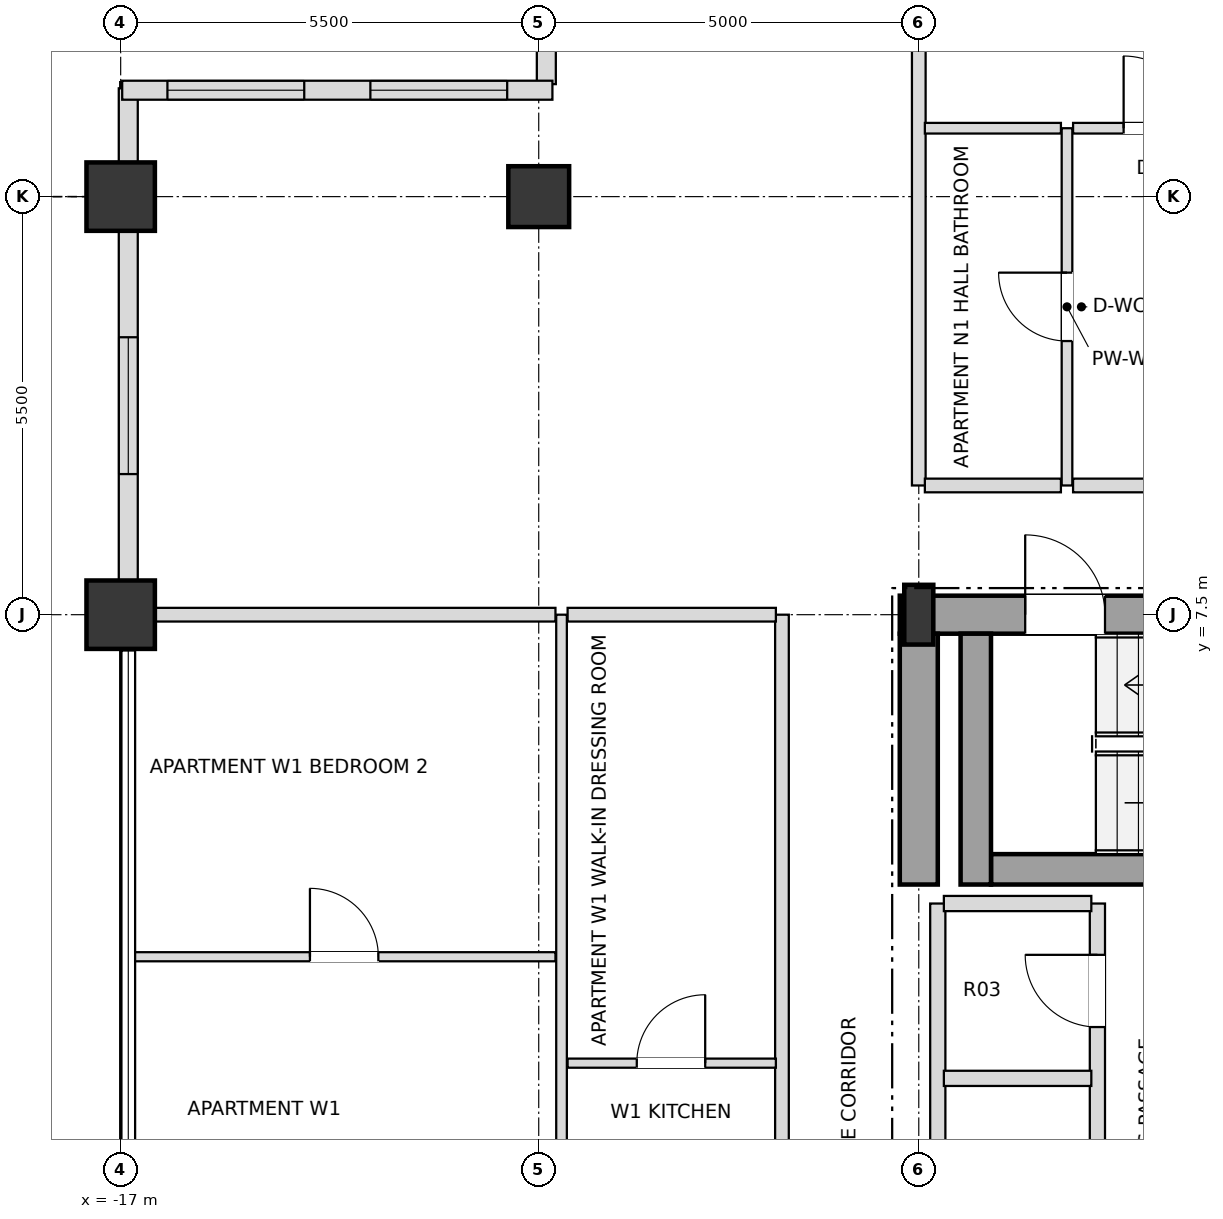
"""IFC4 building model, lengths in metres.
Left out: names, types, materials, properties, quantities, classifications, styles, units other than length and angle.
Written with IfcOpenShell. Run it as: python <this file> out.ifc"""

import sys

from ifc_helpers import new_model, si_unit, direction, frame, frame_2d, origin, origin_2d, place, context, subcontext, project, spatial, rectangle, i_section, extrude, element, fill, save


model = new_model("IFC4")
c1 = context("Model", 3, precision=1e-05, world=origin(), true_north=direction((0.0, 1.0)))
c2 = subcontext(c1, "Body", "Model", "MODEL_VIEW")
j1 = project(units=[si_unit("LENGTHUNIT", "METRE"), si_unit("PLANEANGLEUNIT", "RADIAN")], contexts=[c1])
p1 = place(None, origin())
s1 = spatial("IfcSite", under=j1, at=p1, CompositionType="ELEMENT")
p2 = place(p1, origin())
s2 = spatial("IfcBuilding", under=s1, at=p2, CompositionType="ELEMENT")
p3 = place(p2, frame((0.0, 0.0, 251.1)))
s3 = spatial("IfcBuildingStorey", under=s2, at=p3, CompositionType="ELEMENT", Elevation=251.1)
p4 = place(p3, frame((-6.5, 7.5, 0.0), z_axis=(0.0, 0.0, 1.0), x_axis=(1.0, 0.0, 0.0)))
e1 = element("IfcColumn", 1, at=p4, inside=s3, PredefinedType="COLUMN", context=c2, shape_type="SweptSolid", body=[
    extrude(i_section(OverallWidth=0.382, OverallDepth=0.786, WebThickness=0.02, FlangeThickness=0.033, at=origin_2d()), origin(), (0.0, 0.0, 1.0), 3.6),
])
for number, where, z_axis, x_axis in (
    (2, (-17.0, 13.0, 0.0), (0.0, 0.0, 1.0), (1.0, 0.0, 0.0)),
    (3, (-17.0, 7.5, 0.0), (0.0, 0.0, 1.0), (1.0, 0.0, 0.0)),
):
    element("IfcColumn", number, at=place(p3, frame(where, z_axis=z_axis, x_axis=x_axis)), inside=s3, PredefinedType="USERDEFINED", context=c2, shape_type="SweptSolid", body=[
        extrude(rectangle(XDim=0.9, YDim=0.9, at=origin_2d()), origin(), (0.0, 0.0, 1.0), 3.6),
    ])
p5 = place(p3, frame((-11.5, 13.0, 0.0), z_axis=(0.0, 0.0, 1.0), x_axis=(1.0, 0.0, 0.0)))
e4 = element("IfcColumn", 4, at=p5, inside=s3, PredefinedType="COLUMN", context=c2, shape_type="SweptSolid", body=[
    extrude(rectangle(XDim=0.8, YDim=0.8, at=origin_2d()), origin(), (0.0, 0.0, 1.0), 3.6),
])
p6 = place(p3, frame((-16.9, 14.425, 0.0), z_axis=(0.0, 0.0, 1.0), x_axis=(0.0, -1.0, 0.0)))
e5 = element("IfcWall", 5, at=p6, inside=s3, PredefinedType="SOLIDWALL", context=c2, shape_type="SweptSolid", body=[
    extrude(rectangle(XDim=0.98, YDim=0.25, at=frame_2d((0.49, 0.0))), origin(), (0.0, 0.0, 1.0), 2.748),
])
p7 = place(p3, frame((-16.9, 12.555, 0.0), z_axis=(0.0, 0.0, 1.0), x_axis=(0.0, -1.0, 0.0)))
e6 = element("IfcWall", 6, at=p7, inside=s3, PredefinedType="SOLIDWALL", context=c2, shape_type="SweptSolid", body=[
    extrude(rectangle(XDim=4.61, YDim=0.25, at=frame_2d((2.305, 0.0))), origin(), (0.0, 0.0, 1.0), 2.748),
])
p8 = place(p7, frame((1.405, 0.0, 0.72)))
e7 = element("IfcOpeningElement", 7, at=p8, cuts=e6, PredefinedType="OPENING", context=c2, shape_type="SweptSolid", body=[
    extrude(rectangle(XDim=1.8, YDim=1.68, at=frame_2d((0.9, 0.84))), frame((0.0, 0.135, 0.0), z_axis=(0.0, -1.0, 0.0), x_axis=(1.0, 0.0, 0.0)), (0.0, 0.0, 1.0), 0.27),
])
p9 = place(p3, frame((-11.4, 19.82, 0.0), z_axis=(0.0, 0.0, 1.0), x_axis=(0.0, -1.0, 0.0)))
e8 = element("IfcWall", 8, at=p9, inside=s3, PredefinedType="SOLIDWALL", context=c2, shape_type="SweptSolid", body=[
    extrude(rectangle(XDim=5.34, YDim=0.25, at=frame_2d((2.67, 0.0))), origin(), (0.0, 0.0, 1.0), 2.748),
])
p10 = place(p9, frame((1.925, 0.0, 0.72)))
e9 = element("IfcOpeningElement", 9, at=p10, cuts=e8, PredefinedType="OPENING", context=c2, shape_type="SweptSolid", body=[
    extrude(rectangle(XDim=1.8, YDim=1.68, at=frame_2d((0.9, 0.84))), frame((0.0, 0.135, 0.0), z_axis=(0.0, -1.0, 0.0), x_axis=(1.0, 0.0, 0.0)), (0.0, 0.0, 1.0), 0.27),
])
p11 = place(p3, frame((-11.32, 14.4, 0.0), z_axis=(0.0, 0.0, 1.0), x_axis=(-1.0, 0.0, 0.0)))
e10 = element("IfcWall", 10, at=p11, inside=s3, PredefinedType="SOLIDWALL", context=c2, shape_type="SweptSolid", body=[
    extrude(rectangle(XDim=5.66, YDim=0.25, at=frame_2d((2.83, 0.0))), origin(), (0.0, 0.0, 1.0), 2.748),
])
p12 = place(p11, frame((0.595, 0.0, 0.72)))
e11 = element("IfcOpeningElement", 11, at=p12, cuts=e10, PredefinedType="OPENING", context=c2, shape_type="SweptSolid", body=[
    extrude(rectangle(XDim=1.8, YDim=1.68, at=frame_2d((0.9, 0.84))), frame((0.0, 0.135, 0.0), z_axis=(0.0, -1.0, 0.0), x_axis=(1.0, 0.0, 0.0)), (0.0, 0.0, 1.0), 0.27),
])
p13 = place(p11, frame((3.265, 0.0, 0.72)))
e12 = element("IfcOpeningElement", 12, at=p13, cuts=e10, PredefinedType="OPENING", context=c2, shape_type="SweptSolid", body=[
    extrude(rectangle(XDim=1.8, YDim=1.68, at=frame_2d((0.9, 0.84))), frame((0.0, 0.135, 0.0), z_axis=(0.0, -1.0, 0.0), x_axis=(1.0, 0.0, 0.0)), (0.0, 0.0, 1.0), 0.27),
])
p14 = place(p3, frame((-6.75, 7.5, 0.0), z_axis=(0.0, 0.0, 1.0), x_axis=(1.0, 0.0, 0.0)))
e13 = element("IfcWall", 13, at=p14, inside=s3, PredefinedType="SHEAR", context=c2, shape_type="SweptSolid", body=[
    extrude(rectangle(XDim=6.75, YDim=0.5, at=frame_2d((3.375, 0.0))), origin(), (0.0, 0.0, 1.0), 3.38),
])
p15 = place(p14, frame((1.65, 0.0, 0.0)))
e14 = element("IfcOpeningElement", 14, at=p15, cuts=e13, PredefinedType="OPENING", context=c2, shape_type="SweptSolid", body=[
    extrude(rectangle(XDim=1.05, YDim=2.15, at=frame_2d((0.525, 1.075))), frame((0.0, 0.26, 0.0), z_axis=(0.0, -1.0, 0.0), x_axis=(1.0, 0.0, 0.0)), (0.0, 0.0, 1.0), 0.52),
])
p16 = place(p3, frame((-6.5, 3.95, 0.0), z_axis=(0.0, 0.0, 1.0), x_axis=(0.0, 1.0, 0.0)))
e15 = element("IfcWall", 15, at=p16, inside=s3, PredefinedType="SHEAR", context=c2, shape_type="SweptSolid", body=[
    extrude(rectangle(XDim=3.3, YDim=0.5, at=frame_2d((1.65, 0.0))), origin(), (0.0, 0.0, 1.0), 3.38),
])
p17 = place(p3, frame((-5.55, 4.15, 0.0), z_axis=(0.0, 0.0, 1.0), x_axis=(1.0, 0.0, 0.0)))
e16 = element("IfcWall", 16, at=p17, inside=s3, PredefinedType="SHEAR", context=c2, shape_type="SweptSolid", body=[
    extrude(rectangle(XDim=7.08, YDim=0.4, at=frame_2d((3.54, 0.0))), origin(), (0.0, 0.0, 1.0), 3.38),
])
p18 = place(p3, frame((-5.75, 3.95, 0.0), z_axis=(0.0, 0.0, 1.0), x_axis=(0.0, 1.0, 0.0)))
e17 = element("IfcWall", 17, at=p18, inside=s3, PredefinedType="SHEAR", context=c2, shape_type="SweptSolid", body=[
    extrude(rectangle(XDim=3.3, YDim=0.4, at=frame_2d((1.65, 0.0))), origin(), (0.0, 0.0, 1.0), 3.38),
])
p19 = place(p3, frame((-11.2, -7.5, 0.0), z_axis=(0.0, 0.0, 1.0), x_axis=(0.0, 1.0, 0.0)))
e18 = element("IfcWall", 18, at=p19, inside=s3, PredefinedType="PARTITIONING", context=c2, shape_type="SweptSolid", body=[
    extrude(rectangle(XDim=15.0, YDim=0.14, at=frame_2d((7.5, 0.0))), origin(), (0.0, 0.0, 1.0), 3.38),
])
p20 = place(p19, frame((3.475, 0.0, 0.0)))
e19 = element("IfcOpeningElement", 19, at=p20, cuts=e18, PredefinedType="OPENING", context=c2, shape_type="SweptSolid", body=[
    extrude(rectangle(XDim=0.95, YDim=2.1, at=frame_2d((0.475, 1.05))), frame((0.0, 0.08, 0.0), z_axis=(0.0, -1.0, 0.0), x_axis=(1.0, 0.0, 0.0)), (0.0, 0.0, 1.0), 0.16),
])
p21 = place(p3, frame((-8.3, -7.5, 0.0), z_axis=(0.0, 0.0, 1.0), x_axis=(0.0, 1.0, 0.0)))
e20 = element("IfcWall", 20, at=p21, inside=s3, PredefinedType="PARTITIONING", context=c2, shape_type="SweptSolid", body=[
    extrude(rectangle(XDim=15.0, YDim=0.18, at=frame_2d((7.5, 0.0))), origin(), (0.0, 0.0, 1.0), 3.38),
])
p22 = place(p21, frame((3.475, 0.0, 0.0)))
e21 = element("IfcOpeningElement", 21, at=p22, cuts=e20, PredefinedType="OPENING", context=c2, shape_type="SweptSolid", body=[
    extrude(rectangle(XDim=0.95, YDim=2.15, at=frame_2d((0.475, 1.075))), frame((0.0, 0.1, 0.0), z_axis=(0.0, -1.0, 0.0), x_axis=(1.0, 0.0, 0.0)), (0.0, 0.0, 1.0), 0.2),
])
p23 = place(p3, frame((-6.5, 9.2, 0.0), z_axis=(0.0, 0.0, 1.0), x_axis=(0.0, 1.0, 0.0)))
e22 = element("IfcWall", 22, at=p23, inside=s3, PredefinedType="PARTITIONING", context=c2, shape_type="SweptSolid", body=[
    extrude(rectangle(XDim=10.7, YDim=0.18, at=frame_2d((5.35, 0.0))), origin(), (0.0, 0.0, 1.0), 2.826),
])
p24 = place(p3, frame((-6.25, -3.64, 0.0), z_axis=(0.0, 0.0, 1.0), x_axis=(0.0, 1.0, 0.0)))
e23 = element("IfcWall", 23, at=p24, inside=s3, PredefinedType="SOLIDWALL", context=c2, shape_type="SweptSolid", body=[
    extrude(rectangle(XDim=7.34, YDim=0.2, at=frame_2d((3.67, 0.0))), origin(), (0.0, 0.0, 1.0), 3.38),
])
p25 = place(p3, frame((-4.55, 9.2, 0.0), z_axis=(0.0, 0.0, 1.0), x_axis=(0.0, 1.0, 0.0)))
e24 = element("IfcWall", 24, at=p25, inside=s3, PredefinedType="PARTITIONING", context=c2, shape_type="SweptSolid", body=[
    extrude(rectangle(XDim=4.7, YDim=0.14, at=frame_2d((2.35, 0.0))), origin(), (0.0, 0.0, 1.0), 3.38),
])
p26 = place(p25, frame((1.9, 0.0, 0.0)))
e25 = element("IfcOpeningElement", 25, at=p26, cuts=e24, PredefinedType="OPENING", context=c2, shape_type="SweptSolid", body=[
    extrude(rectangle(XDim=0.9, YDim=2.1, at=frame_2d((0.45, 1.05))), frame((0.0, 0.08, 0.0), z_axis=(0.0, -1.0, 0.0), x_axis=(1.0, 0.0, 0.0)), (0.0, 0.0, 1.0), 0.16),
])
p27 = place(p3, frame((-4.15, -3.7, 0.0), z_axis=(0.0, 0.0, 1.0), x_axis=(0.0, 1.0, 0.0)))
e26 = element("IfcWall", 26, at=p27, inside=s3, PredefinedType="SOLIDWALL", context=c2, shape_type="SweptSolid", body=[
    extrude(rectangle(XDim=7.4, YDim=0.2, at=frame_2d((3.7, 0.0))), origin(), (0.0, 0.0, 1.0), 3.38),
])
p28 = place(p27, frame((2.025, 0.0, 0.0)))
e27 = element("IfcOpeningElement", 27, at=p28, cuts=e26, PredefinedType="OPENING", context=c2, shape_type="SweptSolid", body=[
    extrude(rectangle(XDim=0.95, YDim=2.15, at=frame_2d((0.475, 1.075))), frame((0.0, 0.11, 0.0), z_axis=(0.0, -1.0, 0.0), x_axis=(1.0, 0.0, 0.0)), (0.0, 0.0, 1.0), 0.22),
])
p29 = place(p27, frame((5.775, 0.0, 0.0)))
e28 = element("IfcOpeningElement", 28, at=p29, cuts=e26, PredefinedType="OPENING", context=c2, shape_type="SweptSolid", body=[
    extrude(rectangle(XDim=0.95, YDim=2.15, at=frame_2d((0.475, 1.075))), frame((0.0, 0.11, 0.0), z_axis=(0.0, -1.0, 0.0), x_axis=(1.0, 0.0, 0.0)), (0.0, 0.0, 1.0), 0.22),
])
p30 = place(p3, frame((-6.17, 1.4, 0.0), z_axis=(0.0, 0.0, 1.0), x_axis=(1.0, 0.0, 0.0)))
e29 = element("IfcWall", 29, at=p30, inside=s3, PredefinedType="SOLIDWALL", context=c2, shape_type="SweptSolid", body=[
    extrude(rectangle(XDim=1.94, YDim=0.2, at=frame_2d((0.97, 0.0))), origin(), (0.0, 0.0, 1.0), 3.38),
])
p31 = place(p3, frame((-11.12, 1.6, 0.0), z_axis=(0.0, 0.0, 1.0), x_axis=(1.0, 0.0, 0.0)))
e30 = element("IfcWall", 30, at=p31, inside=s3, PredefinedType="PARTITIONING", context=c2, shape_type="SweptSolid", body=[
    extrude(rectangle(XDim=2.74, YDim=0.12, at=frame_2d((1.37, 0.0))), origin(), (0.0, 0.0, 1.0), 3.38),
])
p32 = place(p31, frame((0.91, 0.0, 0.0)))
e31 = element("IfcOpeningElement", 31, at=p32, cuts=e30, PredefinedType="OPENING", context=c2, shape_type="SweptSolid", body=[
    extrude(rectangle(XDim=0.9, YDim=2.1, at=frame_2d((0.45, 1.05))), frame((0.0, 0.07, 0.0), z_axis=(0.0, -1.0, 0.0), x_axis=(1.0, 0.0, 0.0)), (0.0, 0.0, 1.0), 0.14),
])
p33 = place(p3, frame((-16.82, 3.0, 0.0), z_axis=(0.0, 0.0, 1.0), x_axis=(1.0, 0.0, 0.0)))
e32 = element("IfcWall", 32, at=p33, inside=s3, PredefinedType="PARTITIONING", context=c2, shape_type="SweptSolid", body=[
    extrude(rectangle(XDim=5.54, YDim=0.12, at=frame_2d((2.77, 0.0))), origin(), (0.0, 0.0, 1.0), 3.018),
])
p34 = place(p33, frame((2.31, 0.0, 0.0)))
e33 = element("IfcOpeningElement", 33, at=p34, cuts=e32, PredefinedType="OPENING", context=c2, shape_type="SweptSolid", body=[
    extrude(rectangle(XDim=0.9, YDim=2.1, at=frame_2d((0.45, 1.05))), frame((0.0, 0.07, 0.0), z_axis=(0.0, -1.0, 0.0), x_axis=(1.0, 0.0, 0.0)), (0.0, 0.0, 1.0), 0.14),
])
p35 = place(p3, frame((-6.17, 3.7, 0.0), z_axis=(0.0, 0.0, 1.0), x_axis=(1.0, 0.0, 0.0)))
e34 = element("IfcWall", 34, at=p35, inside=s3, PredefinedType="SOLIDWALL", context=c2, shape_type="SweptSolid", body=[
    extrude(rectangle(XDim=1.94, YDim=0.2, at=frame_2d((0.97, 0.0))), origin(), (0.0, 0.0, 1.0), 3.38),
])
p36 = place(p3, frame((-16.9, 7.5, 0.0), z_axis=(0.0, 0.0, 1.0), x_axis=(1.0, 0.0, 0.0)))
e35 = element("IfcWall", 35, at=p36, inside=s3, PredefinedType="PARTITIONING", context=c2, shape_type="SweptSolid", body=[
    extrude(rectangle(XDim=5.62, YDim=0.18, at=frame_2d((2.81, 0.0))), origin(), (0.0, 0.0, 1.0), 2.826),
])
p37 = place(p3, frame((-11.12, 7.5, 0.0), z_axis=(0.0, 0.0, 1.0), x_axis=(1.0, 0.0, 0.0)))
e36 = element("IfcWall", 36, at=p37, inside=s3, PredefinedType="PARTITIONING", context=c2, shape_type="SweptSolid", body=[
    extrude(rectangle(XDim=2.74, YDim=0.18, at=frame_2d((1.37, 0.0))), origin(), (0.0, 0.0, 1.0), 2.826),
])
p38 = place(p3, frame((-6.42, 9.2, 0.0), z_axis=(0.0, 0.0, 1.0), x_axis=(1.0, 0.0, 0.0)))
e37 = element("IfcWall", 37, at=p38, inside=s3, PredefinedType="PARTITIONING", context=c2, shape_type="SweptSolid", body=[
    extrude(rectangle(XDim=1.79, YDim=0.18, at=frame_2d((0.895, 0.0))), origin(), (0.0, 0.0, 1.0), 3.38),
])
p39 = place(p3, frame((-4.47, 9.2, 0.0), z_axis=(0.0, 0.0, 1.0), x_axis=(1.0, 0.0, 0.0)))
e38 = element("IfcWall", 38, at=p39, inside=s3, PredefinedType="PARTITIONING", context=c2, shape_type="SweptSolid", body=[
    extrude(rectangle(XDim=5.99, YDim=0.18, at=frame_2d((2.995, 0.0))), origin(), (0.0, 0.0, 1.0), 3.38),
])
p40 = place(p39, frame((2.525, 0.0, 0.0)))
e39 = element("IfcOpeningElement", 39, at=p40, cuts=e38, PredefinedType="OPENING", context=c2, shape_type="SweptSolid", body=[
    extrude(rectangle(XDim=0.95, YDim=2.15, at=frame_2d((0.475, 1.075))), frame((0.0, 0.1, 0.0), z_axis=(0.0, -1.0, 0.0), x_axis=(1.0, 0.0, 0.0)), (0.0, 0.0, 1.0), 0.2),
])
p41 = place(p3, frame((-6.42, 13.9, 0.0), z_axis=(0.0, 0.0, 1.0), x_axis=(1.0, 0.0, 0.0)))
e40 = element("IfcWall", 40, at=p41, inside=s3, PredefinedType="PARTITIONING", context=c2, shape_type="SweptSolid", body=[
    extrude(rectangle(XDim=1.79, YDim=0.14, at=frame_2d((0.895, 0.0))), origin(), (0.0, 0.0, 1.0), 3.38),
])
p42 = place(p3, frame((-4.47, 13.9, 0.0), z_axis=(0.0, 0.0, 1.0), x_axis=(1.0, 0.0, 0.0)))
e41 = element("IfcWall", 41, at=p42, inside=s3, PredefinedType="PARTITIONING", context=c2, shape_type="SweptSolid", body=[
    extrude(rectangle(XDim=2.29, YDim=0.14, at=frame_2d((1.145, 0.0))), origin(), (0.0, 0.0, 1.0), 3.38),
])
p43 = place(p42, frame((0.665, 0.0, 0.0)))
e42 = element("IfcOpeningElement", 42, at=p43, cuts=e41, PredefinedType="OPENING", context=c2, shape_type="SweptSolid", body=[
    extrude(rectangle(XDim=0.95, YDim=2.1, at=frame_2d((0.475, 1.05))), frame((0.0, 0.08, 0.0), z_axis=(0.0, -1.0, 0.0), x_axis=(1.0, 0.0, 0.0)), (0.0, 0.0, 1.0), 0.16),
])
p44 = place(p8, origin())
e43 = element("IfcWindow", 43, at=p44, inside=s3, PartitioningType="SINGLE_PANEL", PredefinedType="WINDOW", context=c2, shape_type="SweptSolid", body=[
    extrude(rectangle(XDim=1.8, YDim=1.68, at=frame_2d((0.9, 0.84))), frame((0.0, 0.03, 0.0), z_axis=(0.0, -1.0, 0.0), x_axis=(1.0, 0.0, 0.0)), (0.0, 0.0, 1.0), 0.06),
])
fill(e7, e43)
p45 = place(p12, origin())
e44 = element("IfcWindow", 44, at=p45, inside=s3, PartitioningType="SINGLE_PANEL", PredefinedType="WINDOW", context=c2, shape_type="SweptSolid", body=[
    extrude(rectangle(XDim=1.8, YDim=1.68, at=frame_2d((0.9, 0.84))), frame((0.0, 0.03, 0.0), z_axis=(0.0, -1.0, 0.0), x_axis=(1.0, 0.0, 0.0)), (0.0, 0.0, 1.0), 0.06),
])
fill(e11, e44)
p46 = place(p13, origin())
e45 = element("IfcWindow", 45, at=p46, inside=s3, PartitioningType="SINGLE_PANEL", PredefinedType="WINDOW", context=c2, shape_type="SweptSolid", body=[
    extrude(rectangle(XDim=1.8, YDim=1.68, at=frame_2d((0.9, 0.84))), frame((0.0, 0.03, 0.0), z_axis=(0.0, -1.0, 0.0), x_axis=(1.0, 0.0, 0.0)), (0.0, 0.0, 1.0), 0.06),
])
fill(e12, e45)
p47 = place(p15, origin())
e46 = element("IfcDoor", 46, at=p47, inside=s3, OperationType="SINGLE_SWING_LEFT", PredefinedType="DOOR", context=c2, shape_type="SweptSolid", body=[
    extrude(rectangle(XDim=1.05, YDim=2.15, at=frame_2d((0.525, 1.075))), frame((0.0, 0.025, 0.0), z_axis=(0.0, -1.0, 0.0), x_axis=(1.0, 0.0, 0.0)), (0.0, 0.0, 1.0), 0.05),
])
fill(e14, e46)
p48 = place(p29, origin())
e47 = element("IfcDoor", 47, at=p48, inside=s3, OperationType="SINGLE_SWING_RIGHT", PredefinedType="DOOR", context=c2, shape_type="SweptSolid", body=[
    extrude(rectangle(XDim=0.95, YDim=2.15, at=frame_2d((0.475, 1.075))), frame((0.0, 0.025, 0.0), z_axis=(0.0, -1.0, 0.0), x_axis=(1.0, 0.0, 0.0)), (0.0, 0.0, 1.0), 0.05),
])
fill(e28, e47)
p49 = place(p26, origin())
e48 = element("IfcDoor", 48, at=p49, inside=s3, OperationType="SINGLE_SWING_RIGHT", PredefinedType="DOOR", context=c2, shape_type="SweptSolid", body=[
    extrude(rectangle(XDim=0.9, YDim=2.1, at=frame_2d((0.45, 1.05))), frame((0.0, 0.025, 0.0), z_axis=(0.0, -1.0, 0.0), x_axis=(1.0, 0.0, 0.0)), (0.0, 0.0, 1.0), 0.05),
])
fill(e25, e48)
p50 = place(p43, origin())
e49 = element("IfcDoor", 49, at=p50, inside=s3, OperationType="SINGLE_SWING_LEFT", PredefinedType="DOOR", context=c2, shape_type="SweptSolid", body=[
    extrude(rectangle(XDim=0.95, YDim=2.1, at=frame_2d((0.475, 1.05))), frame((0.0, 0.025, 0.0), z_axis=(0.0, -1.0, 0.0), x_axis=(1.0, 0.0, 0.0)), (0.0, 0.0, 1.0), 0.05),
])
fill(e42, e49)
p51 = place(p32, origin())
e50 = element("IfcDoor", 50, at=p51, inside=s3, OperationType="SINGLE_SWING_RIGHT", PredefinedType="DOOR", context=c2, shape_type="SweptSolid", body=[
    extrude(rectangle(XDim=0.9, YDim=2.1, at=frame_2d((0.45, 1.05))), frame((0.0, 0.025, 0.0), z_axis=(0.0, -1.0, 0.0), x_axis=(1.0, 0.0, 0.0)), (0.0, 0.0, 1.0), 0.05),
])
fill(e31, e50)
p52 = place(p34, origin())
e51 = element("IfcDoor", 51, at=p52, inside=s3, OperationType="SINGLE_SWING_LEFT", PredefinedType="DOOR", context=c2, shape_type="SweptSolid", body=[
    extrude(rectangle(XDim=0.9, YDim=2.1, at=frame_2d((0.45, 1.05))), frame((0.0, 0.025, 0.0), z_axis=(0.0, -1.0, 0.0), x_axis=(1.0, 0.0, 0.0)), (0.0, 0.0, 1.0), 0.05),
])
fill(e33, e51)
save(model, sys.argv[1])
